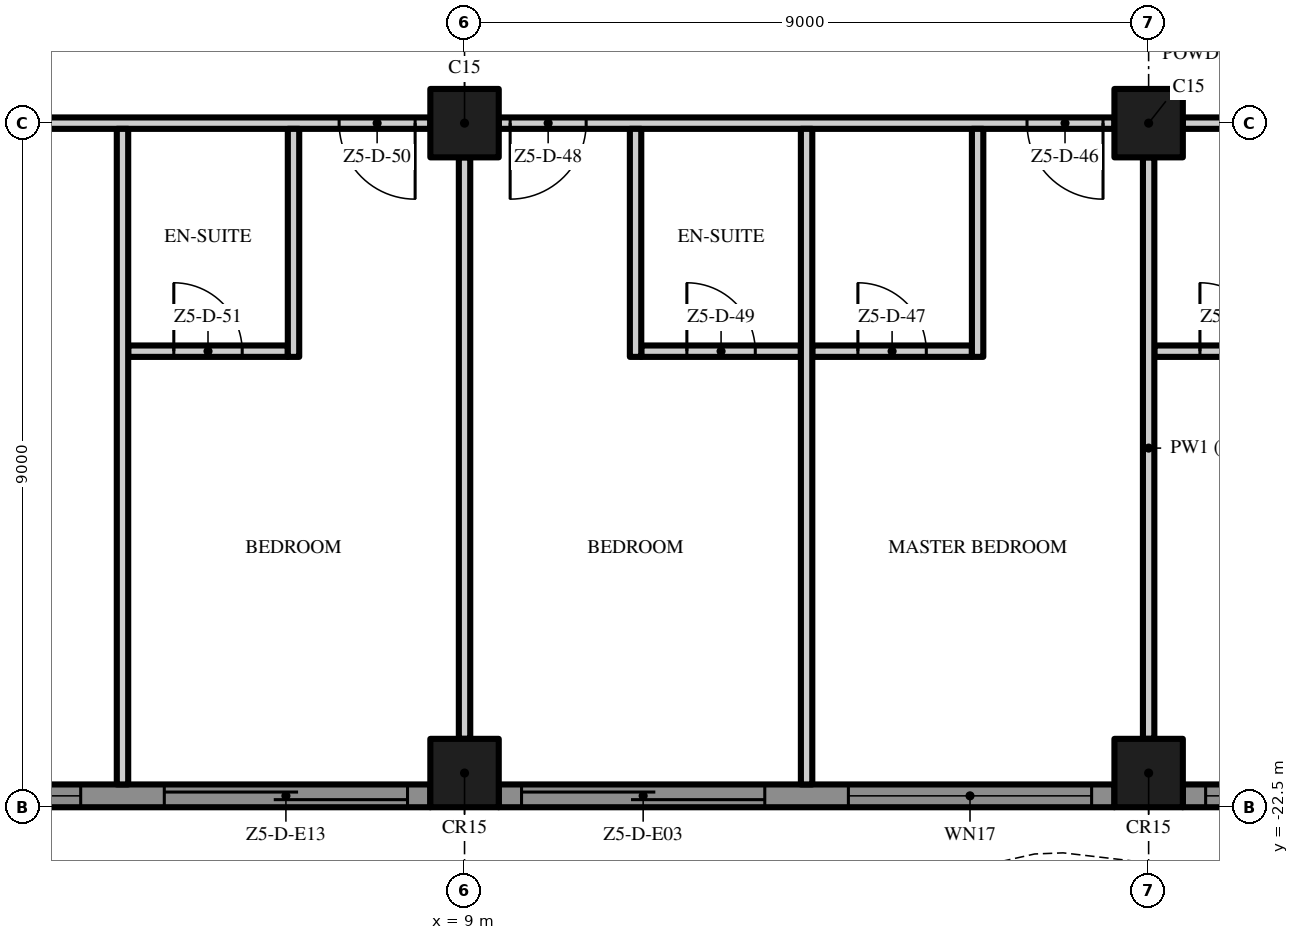
"""IFC4 building model, lengths in metres.
Left out: names, types, materials, properties, quantities, classifications, styles, units other than length and angle.
Written with IfcOpenShell. Run it as: python <this file> out.ifc"""

import sys

from ifc_helpers import new_model, si_unit, direction, frame, frame_2d, origin, origin_2d, place, context, subcontext, project, spatial, polyline, rectangle, outline, extrude, element, fill, save


model = new_model("IFC4")
c1 = context("Model", 3, precision=1e-05, world=origin(), true_north=direction((0.0, 1.0)))
c2 = subcontext(c1, "Body", "Model", "MODEL_VIEW")
j1 = project(units=[si_unit("LENGTHUNIT", "METRE"), si_unit("PLANEANGLEUNIT", "RADIAN")], contexts=[c1])
p1 = place(None, origin())
s1 = spatial("IfcSite", under=j1, at=p1, CompositionType="ELEMENT")
p2 = place(p1, origin())
s2 = spatial("IfcBuilding", under=s1, at=p2, CompositionType="ELEMENT")
p3 = place(p2, frame((0.0, 0.0, 276.8)))
s3 = spatial("IfcBuildingStorey", under=s2, at=p3, CompositionType="ELEMENT", Elevation=276.8)
for number, where, z_axis, x_axis in (
    (1, (18.0, -13.5, 0.0), (0.0, 0.0, 1.0), (1.0, 0.0, 0.0)),
    (2, (18.0, -22.05, 0.0), (0.0, 0.0, 1.0), (1.0, 0.0, 0.0)),
    (3, (9.0, -13.5, 0.0), (0.0, 0.0, 1.0), (1.0, 0.0, 0.0)),
    (4, (9.0, -22.05, 0.0), (0.0, 0.0, 1.0), (1.0, 0.0, 0.0)),
):
    element("IfcColumn", number, at=place(p3, frame(where, z_axis=z_axis, x_axis=x_axis)), inside=s3, PredefinedType="COLUMN", context=c2, shape_type="SweptSolid", body=[
        extrude(rectangle(XDim=0.9, YDim=0.9, at=origin_2d()), origin(), (0.0, 0.0, 1.0), 3.5),
    ])
p4 = place(p3, frame((8.55, -22.35, 0.0), z_axis=(0.0, 0.0, 1.0), x_axis=(-1.0, 0.0, 0.0)))
e5 = element("IfcWall", 5, at=p4, inside=s3, PredefinedType="SOLIDWALL", context=c2, shape_type="SweptSolid", body=[
    extrude(rectangle(XDim=8.1, YDim=0.3, at=frame_2d((4.05, 0.0))), origin(), (0.0, 0.0, 1.0), 3.5),
])
p5 = place(p4, frame((4.6, 0.0, 0.45)))
e6 = element("IfcOpeningElement", 6, at=p5, cuts=e5, PredefinedType="OPENING", context=c2, shape_type="SweptSolid", body=[
    extrude(rectangle(XDim=3.2, YDim=2.65, at=frame_2d((1.6, 1.325))), frame((0.0, 0.16, 0.0), z_axis=(0.0, -1.0, 0.0), x_axis=(1.0, 0.0, 0.0)), (0.0, 0.0, 1.0), 0.32),
])
p6 = place(p4, frame((0.3, 0.0, 0.0)))
e7 = element("IfcOpeningElement", 7, at=p6, cuts=e5, PredefinedType="OPENING", context=c2, shape_type="SweptSolid", body=[
    extrude(rectangle(XDim=3.2, YDim=2.4, at=frame_2d((1.6, 1.2))), frame((0.0, 0.16, 0.0), z_axis=(0.0, -1.0, 0.0), x_axis=(1.0, 0.0, 0.0)), (0.0, 0.0, 1.0), 0.32),
])
p7 = place(p3, frame((17.55, -22.35, 0.0), z_axis=(0.0, 0.0, 1.0), x_axis=(-1.0, 0.0, 0.0)))
e8 = element("IfcWall", 8, at=p7, inside=s3, PredefinedType="SOLIDWALL", context=c2, shape_type="SweptSolid", body=[
    extrude(rectangle(XDim=8.1, YDim=0.3, at=frame_2d((4.05, 0.0))), origin(), (0.0, 0.0, 1.0), 3.5),
])
p8 = place(p7, frame((4.6, 0.0, 0.0)))
e9 = element("IfcOpeningElement", 9, at=p8, cuts=e8, PredefinedType="OPENING", context=c2, shape_type="SweptSolid", body=[
    extrude(rectangle(XDim=3.2, YDim=2.4, at=frame_2d((1.6, 1.2))), frame((0.0, 0.16, 0.0), z_axis=(0.0, -1.0, 0.0), x_axis=(1.0, 0.0, 0.0)), (0.0, 0.0, 1.0), 0.32),
])
p9 = place(p7, frame((0.3, 0.0, 0.45)))
e10 = element("IfcOpeningElement", 10, at=p9, cuts=e8, PredefinedType="OPENING", context=c2, shape_type="SweptSolid", body=[
    extrude(rectangle(XDim=3.2, YDim=2.65, at=frame_2d((1.6, 1.325))), frame((0.0, 0.16, 0.0), z_axis=(0.0, -1.0, 0.0), x_axis=(1.0, 0.0, 0.0)), (0.0, 0.0, 1.0), 0.32),
])
p10 = place(p3, frame((22.5, -22.35, 0.0), z_axis=(0.0, 0.0, 1.0), x_axis=(-1.0, 0.0, 0.0)))
e11 = element("IfcWall", 11, at=p10, inside=s3, PredefinedType="SOLIDWALL", context=c2, shape_type="SweptSolid", body=[
    extrude(rectangle(XDim=4.05, YDim=0.3, at=frame_2d((2.025, 0.0))), origin(), (0.0, 0.0, 1.0), 3.5),
])
p11 = place(p10, frame((0.55, 0.0, 0.45)))
e12 = element("IfcOpeningElement", 12, at=p11, cuts=e11, PredefinedType="OPENING", context=c2, shape_type="SweptSolid", body=[
    extrude(rectangle(XDim=3.2, YDim=2.65, at=frame_2d((1.6, 1.325))), frame((0.0, 0.16, 0.0), z_axis=(0.0, -1.0, 0.0), x_axis=(1.0, 0.0, 0.0)), (0.0, 0.0, 1.0), 0.32),
])
p12 = place(p3, origin())
e13 = element("IfcWall", 13, at=p12, inside=s3, PredefinedType="USERDEFINED", context=c2, shape_type="SweptSolid", body=[
    extrude(outline(polyline([(-22.5, -25.149), (-21.0, -25.485), (-20.625, -25.5), (-19.5, -25.369), (-18.0, -24.845), (-16.5, -24.112), (-15.0, -23.451), (-13.5, -23.115), (-13.125, -23.1), (-12.0, -23.231), (-10.5, -23.755), (-9.0, -24.488), (-7.5, -25.149), (-6.0, -25.485), (-5.625, -25.5), (-4.5, -25.369), (-3.0, -24.845), (-1.5, -24.112), (0.0, -23.451), (1.5, -23.115), (1.875, -23.1), (3.0, -23.231), (4.5, -23.755), (6.0, -24.488), (7.5, -25.149), (9.0, -25.485), (9.375, -25.5), (10.5, -25.369), (12.0, -24.845), (13.5, -24.112), (15.0, -23.451), (16.5, -23.115), (16.875, -23.1), (18.0, -23.231), (19.5, -23.755), (21.0, -24.488), (22.5, -25.149), (22.601, -24.92), (21.105, -24.261), (19.596, -23.524), (18.056, -22.986), (16.885, -22.849), (16.467, -22.866), (14.921, -23.213), (13.395, -23.885), (11.904, -24.614), (10.444, -25.124), (9.365, -25.249), (9.033, -25.236), (7.579, -24.91), (6.105, -24.261), (4.596, -23.524), (3.056, -22.986), (1.885, -22.849), (1.467, -22.866), (-0.079, -23.213), (-1.605, -23.885), (-3.096, -24.614), (-4.556, -25.124), (-5.635, -25.249), (-5.967, -25.236), (-7.421, -24.91), (-8.895, -24.261), (-10.404, -23.524), (-11.944, -22.986), (-13.115, -22.849), (-13.533, -22.866), (-15.079, -23.213), (-16.605, -23.885), (-18.096, -24.614), (-19.556, -25.124), (-20.635, -25.249), (-20.967, -25.236), (-22.445, -24.905), (-22.5, -25.149)])), origin(), (0.0, 0.0, 1.0), 0.9),
])
p13 = place(p3, frame((4.575, -16.5, 0.0), z_axis=(0.0, 0.0, 1.0), x_axis=(1.0, 0.0, 0.0)))
e14 = element("IfcWall", 14, at=p13, inside=s3, PredefinedType="PARTITIONING", context=c2, shape_type="SweptSolid", body=[
    extrude(rectangle(XDim=2.1, YDim=0.15, at=frame_2d((1.05, 0.0))), origin(), (0.0, 0.0, 1.0), 3.5),
])
p14 = place(p13, frame((0.6, 0.0, 0.0)))
e15 = element("IfcOpeningElement", 15, at=p14, cuts=e14, PredefinedType="OPENING", context=c2, shape_type="SweptSolid", body=[
    extrude(rectangle(XDim=0.9, YDim=2.1, at=frame_2d((0.45, 1.05))), frame((0.0, 0.085, 0.0), z_axis=(0.0, -1.0, 0.0), x_axis=(1.0, 0.0, 0.0)), (0.0, 0.0, 1.0), 0.17),
])
p15 = place(p3, frame((11.325, -16.5, 0.0), z_axis=(0.0, 0.0, 1.0), x_axis=(1.0, 0.0, 0.0)))
e16 = element("IfcWall", 16, at=p15, inside=s3, PredefinedType="PARTITIONING", context=c2, shape_type="SweptSolid", body=[
    extrude(rectangle(XDim=2.1, YDim=0.15, at=frame_2d((1.05, 0.0))), origin(), (0.0, 0.0, 1.0), 3.5),
])
p16 = place(p15, frame((0.6, 0.0, 0.0)))
e17 = element("IfcOpeningElement", 17, at=p16, cuts=e16, PredefinedType="OPENING", context=c2, shape_type="SweptSolid", body=[
    extrude(rectangle(XDim=0.9, YDim=2.1, at=frame_2d((0.45, 1.05))), frame((0.0, 0.085, 0.0), z_axis=(0.0, -1.0, 0.0), x_axis=(1.0, 0.0, 0.0)), (0.0, 0.0, 1.0), 0.17),
])
p17 = place(p3, frame((13.575, -16.5, 0.0), z_axis=(0.0, 0.0, 1.0), x_axis=(1.0, 0.0, 0.0)))
e18 = element("IfcWall", 18, at=p17, inside=s3, PredefinedType="PARTITIONING", context=c2, shape_type="SweptSolid", body=[
    extrude(rectangle(XDim=2.1, YDim=0.15, at=frame_2d((1.05, 0.0))), origin(), (0.0, 0.0, 1.0), 3.5),
])
p18 = place(p17, frame((0.6, 0.0, 0.0)))
e19 = element("IfcOpeningElement", 19, at=p18, cuts=e18, PredefinedType="OPENING", context=c2, shape_type="SweptSolid", body=[
    extrude(rectangle(XDim=0.9, YDim=2.1, at=frame_2d((0.45, 1.05))), frame((0.0, 0.085, 0.0), z_axis=(0.0, -1.0, 0.0), x_axis=(1.0, 0.0, 0.0)), (0.0, 0.0, 1.0), 0.17),
])
p19 = place(p3, frame((18.075, -16.5, 0.0), z_axis=(0.0, 0.0, 1.0), x_axis=(1.0, 0.0, 0.0)))
e20 = element("IfcWall", 20, at=p19, inside=s3, PredefinedType="PARTITIONING", context=c2, shape_type="SweptSolid", body=[
    extrude(rectangle(XDim=2.1, YDim=0.15, at=frame_2d((1.05, 0.0))), origin(), (0.0, 0.0, 1.0), 3.5),
])
p20 = place(p19, frame((0.6, 0.0, 0.0)))
e21 = element("IfcOpeningElement", 21, at=p20, cuts=e20, PredefinedType="OPENING", context=c2, shape_type="SweptSolid", body=[
    extrude(rectangle(XDim=0.9, YDim=2.1, at=frame_2d((0.45, 1.05))), frame((0.0, 0.085, 0.0), z_axis=(0.0, -1.0, 0.0), x_axis=(1.0, 0.0, 0.0)), (0.0, 0.0, 1.0), 0.17),
])
p21 = place(p3, frame((8.55, -13.5, 0.0), z_axis=(0.0, 0.0, 1.0), x_axis=(-1.0, 0.0, 0.0)))
e22 = element("IfcWall", 22, at=p21, inside=s3, PredefinedType="PARTITIONING", context=c2, shape_type="SweptSolid", body=[
    extrude(rectangle(XDim=8.1, YDim=0.15, at=frame_2d((4.05, 0.0))), origin(), (0.0, 0.0, 1.0), 3.5),
])
p22 = place(p21, frame((0.2, 0.0, 0.0)))
e23 = element("IfcOpeningElement", 23, at=p22, cuts=e22, PredefinedType="OPENING", context=c2, shape_type="SweptSolid", body=[
    extrude(rectangle(XDim=1.0, YDim=2.4, at=frame_2d((0.5, 1.2))), frame((0.0, 0.085, 0.0), z_axis=(0.0, -1.0, 0.0), x_axis=(1.0, 0.0, 0.0)), (0.0, 0.0, 1.0), 0.17),
])
p23 = place(p21, frame((5.8, 0.0, 0.0)))
e24 = element("IfcOpeningElement", 24, at=p23, cuts=e22, PredefinedType="OPENING", context=c2, shape_type="SweptSolid", body=[
    extrude(rectangle(XDim=1.0, YDim=2.4, at=frame_2d((0.5, 1.2))), frame((0.0, 0.085, 0.0), z_axis=(0.0, -1.0, 0.0), x_axis=(1.0, 0.0, 0.0)), (0.0, 0.0, 1.0), 0.17),
])
p24 = place(p3, frame((17.55, -13.5, 0.0), z_axis=(0.0, 0.0, 1.0), x_axis=(-1.0, 0.0, 0.0)))
e25 = element("IfcWall", 25, at=p24, inside=s3, PredefinedType="PARTITIONING", context=c2, shape_type="SweptSolid", body=[
    extrude(rectangle(XDim=8.1, YDim=0.15, at=frame_2d((4.05, 0.0))), origin(), (0.0, 0.0, 1.0), 3.5),
])
p25 = place(p24, frame((0.15, 0.0, 0.0)))
e26 = element("IfcOpeningElement", 26, at=p25, cuts=e25, PredefinedType="OPENING", context=c2, shape_type="SweptSolid", body=[
    extrude(rectangle(XDim=1.0, YDim=2.4, at=frame_2d((0.5, 1.2))), frame((0.0, 0.085, 0.0), z_axis=(0.0, -1.0, 0.0), x_axis=(1.0, 0.0, 0.0)), (0.0, 0.0, 1.0), 0.17),
])
p26 = place(p24, frame((6.95, 0.0, 0.0)))
e27 = element("IfcOpeningElement", 27, at=p26, cuts=e25, PredefinedType="OPENING", context=c2, shape_type="SweptSolid", body=[
    extrude(rectangle(XDim=1.0, YDim=2.4, at=frame_2d((0.5, 1.2))), frame((0.0, 0.085, 0.0), z_axis=(0.0, -1.0, 0.0), x_axis=(1.0, 0.0, 0.0)), (0.0, 0.0, 1.0), 0.17),
])
p27 = place(p3, frame((26.1, -13.5, 0.0), z_axis=(0.0, 0.0, 1.0), x_axis=(-1.0, 0.0, 0.0)))
e28 = element("IfcWall", 28, at=p27, inside=s3, PredefinedType="PARTITIONING", context=c2, shape_type="SweptSolid", body=[
    extrude(rectangle(XDim=7.65, YDim=0.15, at=frame_2d((3.825, 0.0))), origin(), (0.0, 0.0, 1.0), 3.5),
])
p28 = place(p27, frame((1.6, 0.0, 0.0)))
e29 = element("IfcOpeningElement", 29, at=p28, cuts=e28, PredefinedType="OPENING", context=c2, shape_type="SweptSolid", body=[
    extrude(rectangle(XDim=1.8, YDim=2.4, at=frame_2d((0.9, 1.2))), frame((0.0, 0.085, 0.0), z_axis=(0.0, -1.0, 0.0), x_axis=(1.0, 0.0, 0.0)), (0.0, 0.0, 1.0), 0.17),
])
p29 = place(p3, frame((4.5, -22.2, 0.0), z_axis=(0.0, 0.0, 1.0), x_axis=(0.0, 1.0, 0.0)))
e30 = element("IfcWall", 30, at=p29, inside=s3, PredefinedType="PARTITIONING", context=c2, shape_type="SweptSolid", body=[
    extrude(rectangle(XDim=8.625, YDim=0.15, at=frame_2d((4.312, 0.0))), origin(), (0.0, 0.0, 1.0), 3.5),
])
p30 = place(p3, frame((6.75, -16.575, 0.0), z_axis=(0.0, 0.0, 1.0), x_axis=(0.0, 1.0, 0.0)))
e31 = element("IfcWall", 31, at=p30, inside=s3, PredefinedType="PARTITIONING", context=c2, shape_type="SweptSolid", body=[
    extrude(rectangle(XDim=3.0, YDim=0.15, at=frame_2d((1.5, 0.0))), origin(), (0.0, 0.0, 1.0), 3.5),
])
p31 = place(p3, frame((9.0, -21.6, 0.0), z_axis=(0.0, 0.0, 1.0), x_axis=(0.0, 1.0, 0.0)))
e32 = element("IfcWall", 32, at=p31, inside=s3, PredefinedType="PARTITIONING", context=c2, shape_type="SweptSolid", body=[
    extrude(rectangle(XDim=7.65, YDim=0.15, at=frame_2d((3.825, 0.0))), origin(), (0.0, 0.0, 1.0), 3.5),
])
p32 = place(p3, frame((11.25, -16.575, 0.0), z_axis=(0.0, 0.0, 1.0), x_axis=(0.0, 1.0, 0.0)))
e33 = element("IfcWall", 33, at=p32, inside=s3, PredefinedType="PARTITIONING", context=c2, shape_type="SweptSolid", body=[
    extrude(rectangle(XDim=3.0, YDim=0.15, at=frame_2d((1.5, 0.0))), origin(), (0.0, 0.0, 1.0), 3.5),
])
p33 = place(p3, frame((13.5, -22.2, 0.0), z_axis=(0.0, 0.0, 1.0), x_axis=(0.0, 1.0, 0.0)))
e34 = element("IfcWall", 34, at=p33, inside=s3, PredefinedType="PARTITIONING", context=c2, shape_type="SweptSolid", body=[
    extrude(rectangle(XDim=8.625, YDim=0.15, at=frame_2d((4.312, 0.0))), origin(), (0.0, 0.0, 1.0), 3.5),
])
p34 = place(p3, frame((15.75, -16.575, 0.0), z_axis=(0.0, 0.0, 1.0), x_axis=(0.0, 1.0, 0.0)))
e35 = element("IfcWall", 35, at=p34, inside=s3, PredefinedType="PARTITIONING", context=c2, shape_type="SweptSolid", body=[
    extrude(rectangle(XDim=3.0, YDim=0.15, at=frame_2d((1.5, 0.0))), origin(), (0.0, 0.0, 1.0), 3.5),
])
p35 = place(p3, frame((18.0, -21.6, 0.0), z_axis=(0.0, 0.0, 1.0), x_axis=(0.0, 1.0, 0.0)))
e36 = element("IfcWall", 36, at=p35, inside=s3, PredefinedType="PARTITIONING", context=c2, shape_type="SweptSolid", body=[
    extrude(rectangle(XDim=7.65, YDim=0.15, at=frame_2d((3.825, 0.0))), origin(), (0.0, 0.0, 1.0), 3.5),
])
p36 = place(p5, origin())
e37 = element("IfcWindow", 37, at=p36, inside=s3, PartitioningType="SINGLE_PANEL", PredefinedType="WINDOW", context=c2, shape_type="SweptSolid", body=[
    extrude(rectangle(XDim=3.2, YDim=2.65, at=frame_2d((1.6, 1.325))), frame((0.0, 0.03, 0.0), z_axis=(0.0, -1.0, 0.0), x_axis=(1.0, 0.0, 0.0)), (0.0, 0.0, 1.0), 0.06),
])
fill(e6, e37)
p37 = place(p6, origin())
e38 = element("IfcDoor", 38, at=p37, inside=s3, OperationType="SINGLE_SWING_LEFT", PredefinedType="DOOR", context=c2, shape_type="SweptSolid", body=[
    extrude(rectangle(XDim=3.2, YDim=2.4, at=frame_2d((1.6, 1.2))), frame((0.0, 0.025, 0.0), z_axis=(0.0, -1.0, 0.0), x_axis=(1.0, 0.0, 0.0)), (0.0, 0.0, 1.0), 0.05),
])
fill(e7, e38)
p38 = place(p8, origin())
e39 = element("IfcDoor", 39, at=p38, inside=s3, OperationType="SINGLE_SWING_LEFT", PredefinedType="DOOR", context=c2, shape_type="SweptSolid", body=[
    extrude(rectangle(XDim=3.2, YDim=2.4, at=frame_2d((1.6, 1.2))), frame((0.0, 0.025, 0.0), z_axis=(0.0, -1.0, 0.0), x_axis=(1.0, 0.0, 0.0)), (0.0, 0.0, 1.0), 0.05),
])
fill(e9, e39)
p39 = place(p9, origin())
e40 = element("IfcWindow", 40, at=p39, inside=s3, PartitioningType="SINGLE_PANEL", PredefinedType="WINDOW", context=c2, shape_type="SweptSolid", body=[
    extrude(rectangle(XDim=3.2, YDim=2.65, at=frame_2d((1.6, 1.325))), frame((0.0, 0.03, 0.0), z_axis=(0.0, -1.0, 0.0), x_axis=(1.0, 0.0, 0.0)), (0.0, 0.0, 1.0), 0.06),
])
fill(e10, e40)
p40 = place(p11, origin())
e41 = element("IfcWindow", 41, at=p40, inside=s3, PartitioningType="SINGLE_PANEL", PredefinedType="WINDOW", context=c2, shape_type="SweptSolid", body=[
    extrude(rectangle(XDim=3.2, YDim=2.65, at=frame_2d((1.6, 1.325))), frame((0.0, 0.03, 0.0), z_axis=(0.0, -1.0, 0.0), x_axis=(1.0, 0.0, 0.0)), (0.0, 0.0, 1.0), 0.06),
])
fill(e12, e41)
p41 = place(p20, origin())
e42 = element("IfcDoor", 42, at=p41, inside=s3, OperationType="SINGLE_SWING_LEFT", PredefinedType="DOOR", context=c2, shape_type="SweptSolid", body=[
    extrude(rectangle(XDim=0.9, YDim=2.1, at=frame_2d((0.45, 1.05))), frame((0.0, 0.025, 0.0), z_axis=(0.0, -1.0, 0.0), x_axis=(1.0, 0.0, 0.0)), (0.0, 0.0, 1.0), 0.05),
])
fill(e21, e42)
p42 = place(p25, origin())
e43 = element("IfcDoor", 43, at=p42, inside=s3, OperationType="SINGLE_SWING_LEFT", PredefinedType="DOOR", context=c2, shape_type="SweptSolid", body=[
    extrude(rectangle(XDim=1.0, YDim=2.4, at=frame_2d((0.5, 1.2))), frame((0.0, 0.025, 0.0), z_axis=(0.0, -1.0, 0.0), x_axis=(1.0, 0.0, 0.0)), (0.0, 0.0, 1.0), 0.05),
])
fill(e26, e43)
p43 = place(p18, origin())
e44 = element("IfcDoor", 44, at=p43, inside=s3, OperationType="SINGLE_SWING_LEFT", PredefinedType="DOOR", context=c2, shape_type="SweptSolid", body=[
    extrude(rectangle(XDim=0.9, YDim=2.1, at=frame_2d((0.45, 1.05))), frame((0.0, 0.025, 0.0), z_axis=(0.0, -1.0, 0.0), x_axis=(1.0, 0.0, 0.0)), (0.0, 0.0, 1.0), 0.05),
])
fill(e19, e44)
p44 = place(p26, origin())
e45 = element("IfcDoor", 45, at=p44, inside=s3, OperationType="SINGLE_SWING_RIGHT", PredefinedType="DOOR", context=c2, shape_type="SweptSolid", body=[
    extrude(rectangle(XDim=1.0, YDim=2.4, at=frame_2d((0.5, 1.2))), frame((0.0, 0.025, 0.0), z_axis=(0.0, -1.0, 0.0), x_axis=(1.0, 0.0, 0.0)), (0.0, 0.0, 1.0), 0.05),
])
fill(e27, e45)
p45 = place(p16, origin())
e46 = element("IfcDoor", 46, at=p45, inside=s3, OperationType="SINGLE_SWING_LEFT", PredefinedType="DOOR", context=c2, shape_type="SweptSolid", body=[
    extrude(rectangle(XDim=0.9, YDim=2.1, at=frame_2d((0.45, 1.05))), frame((0.0, 0.025, 0.0), z_axis=(0.0, -1.0, 0.0), x_axis=(1.0, 0.0, 0.0)), (0.0, 0.0, 1.0), 0.05),
])
fill(e17, e46)
p46 = place(p22, origin())
e47 = element("IfcDoor", 47, at=p46, inside=s3, OperationType="SINGLE_SWING_LEFT", PredefinedType="DOOR", context=c2, shape_type="SweptSolid", body=[
    extrude(rectangle(XDim=1.0, YDim=2.4, at=frame_2d((0.5, 1.2))), frame((0.0, 0.025, 0.0), z_axis=(0.0, -1.0, 0.0), x_axis=(1.0, 0.0, 0.0)), (0.0, 0.0, 1.0), 0.05),
])
fill(e23, e47)
p47 = place(p14, origin())
e48 = element("IfcDoor", 48, at=p47, inside=s3, OperationType="SINGLE_SWING_LEFT", PredefinedType="DOOR", context=c2, shape_type="SweptSolid", body=[
    extrude(rectangle(XDim=0.9, YDim=2.1, at=frame_2d((0.45, 1.05))), frame((0.0, 0.025, 0.0), z_axis=(0.0, -1.0, 0.0), x_axis=(1.0, 0.0, 0.0)), (0.0, 0.0, 1.0), 0.05),
])
fill(e15, e48)
save(model, sys.argv[1])
